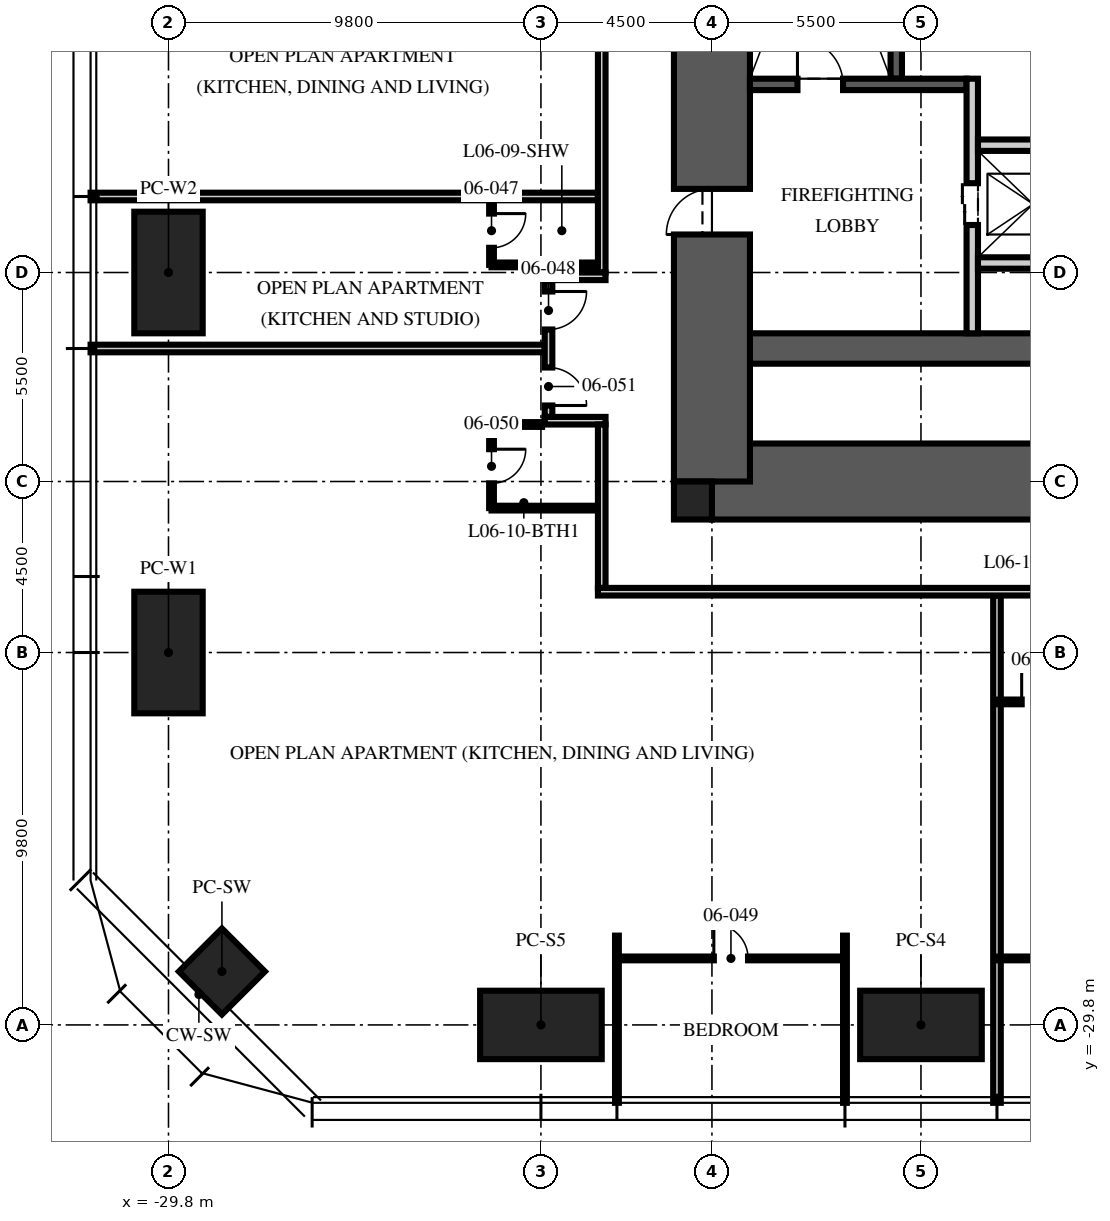
"""IFC4 building model, lengths in metres.
Left out: names, types, materials, properties, quantities, classifications, styles, units other than length and angle.
Written with IfcOpenShell. Run it as: python <this file> out.ifc"""

import sys

from ifc_helpers import new_model, si_unit, direction, frame, frame_2d, origin, origin_2d, place, context, subcontext, project, spatial, rectangle, hollow_rectangle, extrude, element, fill, save


model = new_model("IFC4")
c1 = context("Model", 3, precision=1e-05, world=origin(), true_north=direction((0.0, 1.0)))
c2 = subcontext(c1, "Body", "Model", "MODEL_VIEW")
j1 = project(units=[si_unit("LENGTHUNIT", "METRE"), si_unit("PLANEANGLEUNIT", "RADIAN")], contexts=[c1])
p1 = place(None, origin())
s1 = spatial("IfcSite", under=j1, at=p1, CompositionType="ELEMENT")
p2 = place(p1, origin())
s2 = spatial("IfcBuilding", under=s1, at=p2, CompositionType="ELEMENT")
p3 = place(p2, frame((0.0, 0.0, 28.5)))
s3 = spatial("IfcBuildingStorey", under=s2, at=p3, CompositionType="ELEMENT", Elevation=28.5)
p4 = place(p3, frame((-15.5, -15.5, -0.25), z_axis=(0.0, 0.0, 1.0), x_axis=(1.0, 0.0, 0.0)))
e1 = element("IfcWall", 1, at=p4, inside=s3, PredefinedType="SHEAR", context=c2, shape_type="SweptSolid", body=[
    extrude(rectangle(XDim=31.0, YDim=2.0, at=frame_2d((15.5, 0.0))), origin(), (0.0, 0.0, 1.0), 3.75),
])
p5 = place(p3, frame((-15.5, -12.0, -0.25), z_axis=(0.0, 0.0, 1.0), x_axis=(1.0, 0.0, 0.0)))
e2 = element("IfcWall", 2, at=p5, inside=s3, PredefinedType="SHEAR", context=c2, shape_type="SweptSolid", body=[
    extrude(rectangle(XDim=31.0, YDim=0.8, at=frame_2d((15.5, 0.0))), origin(), (0.0, 0.0, 1.0), 3.75),
])
p6 = place(p3, frame((-15.5, -15.5, -0.25), z_axis=(0.0, 0.0, 1.0), x_axis=(0.0, 1.0, 0.0)))
e3 = element("IfcWall", 3, at=p6, inside=s3, PredefinedType="SHEAR", context=c2, shape_type="SweptSolid", body=[
    extrude(rectangle(XDim=31.0, YDim=2.0, at=frame_2d((15.5, 0.0))), origin(), (0.0, 0.0, 1.0), 3.75),
])
p7 = place(p6, frame((6.5, 0.0, 0.25)))
e4 = element("IfcOpeningElement", 4, at=p7, cuts=e3, PredefinedType="OPENING", context=c2, shape_type="SweptSolid", body=[
    extrude(rectangle(XDim=1.2, YDim=2.1, at=frame_2d((0.6, 1.05))), frame((0.0, 1.01, 0.0), z_axis=(0.0, -1.0, 0.0), x_axis=(1.0, 0.0, 0.0)), (0.0, 0.0, 1.0), 2.02),
])
p8 = place(p6, frame((23.0, 0.0, 0.25)))
e5 = element("IfcOpeningElement", 5, at=p8, cuts=e3, PredefinedType="OPENING", context=c2, shape_type="SweptSolid", body=[
    extrude(rectangle(XDim=1.8, YDim=2.1, at=frame_2d((0.9, 1.05))), frame((0.0, 1.01, 0.0), z_axis=(0.0, -1.0, 0.0), x_axis=(1.0, 0.0, 0.0)), (0.0, 0.0, 1.0), 2.02),
])
p9 = place(p3, frame((-16.0, -16.0, -0.25), z_axis=(0.0, 0.0, 1.0), x_axis=(1.0, 0.0, 0.0)))
e6 = element("IfcColumn", 6, at=p9, inside=s3, PredefinedType="COLUMN", context=c2, shape_type="SweptSolid", body=[
    extrude(rectangle(XDim=1.0, YDim=1.0, at=origin_2d()), origin(), (0.0, 0.0, 1.0), 3.75),
])
for number, where, z_axis, x_axis in (
    (7, (-10.0, -29.8, 0.0), (0.0, 0.0, 1.0), (1.0, 0.0, 0.0)),
    (8, (-20.0, -29.8, 0.0), (0.0, 0.0, 1.0), (1.0, 0.0, 0.0)),
    (9, (-29.8, -20.0, 0.0), (0.0, 0.0, 1.0), (0.0, 1.0, 0.0)),
    (10, (-29.8, -10.0, 0.0), (0.0, 0.0, 1.0), (0.0, 1.0, 0.0)),
):
    element("IfcColumn", number, at=place(p3, frame(where, z_axis=z_axis, x_axis=x_axis)), inside=s3, PredefinedType="COLUMN", context=c2, shape_type="SweptSolid", body=[
        extrude(hollow_rectangle(XDim=3.2, YDim=1.8, WallThickness=0.2, at=origin_2d()), origin(), (0.0, 0.0, 1.0), 3.75),
    ])
p10 = place(p3, frame((-28.394, -28.394, 0.0), z_axis=(0.0, 0.0, 1.0), x_axis=(0.707106781187, -0.707106781187, 0.0)))
e11 = element("IfcColumn", 11, at=p10, inside=s3, PredefinedType="COLUMN", context=c2, shape_type="SweptSolid", body=[
    extrude(hollow_rectangle(XDim=1.6, YDim=1.6, WallThickness=0.1, at=origin_2d()), origin(), (0.0, 0.0, 1.0), 3.75),
])
p11 = place(p3, frame((-10.65, -4.9, 0.0), z_axis=(0.0, 0.0, 1.0), x_axis=(0.0, 1.0, 0.0)))
e12 = element("IfcWall", 12, at=p11, inside=s3, PredefinedType="SOLIDWALL", context=c2, shape_type="SweptSolid", body=[
    extrude(rectangle(XDim=10.1, YDim=0.3, at=frame_2d((5.05, 0.0))), origin(), (0.0, 0.0, 1.0), 3.5),
])
p12 = place(p3, frame((-14.5, -5.05, 0.0), z_axis=(0.0, 0.0, 1.0), x_axis=(1.0, 0.0, 0.0)))
e13 = element("IfcWall", 13, at=p12, inside=s3, PredefinedType="SOLIDWALL", context=c2, shape_type="SweptSolid", body=[
    extrude(rectangle(XDim=5.7, YDim=0.3, at=frame_2d((2.85, 0.0))), origin(), (0.0, 0.0, 1.0), 3.5),
])
p13 = place(p12, frame((1.25, 0.0, 0.0)))
e14 = element("IfcOpeningElement", 14, at=p13, cuts=e13, PredefinedType="OPENING", context=c2, shape_type="SweptSolid", body=[
    extrude(rectangle(XDim=1.2, YDim=2.1, at=frame_2d((0.6, 1.05))), frame((0.0, 0.16, 0.0), z_axis=(0.0, -1.0, 0.0), x_axis=(1.0, 0.0, 0.0)), (0.0, 0.0, 1.0), 0.32),
])
p14 = place(p3, frame((-8.65, -11.6, 0.0), z_axis=(0.0, 0.0, 1.0), x_axis=(0.0, 1.0, 0.0)))
e15 = element("IfcWall", 15, at=p14, inside=s3, PredefinedType="PARTITIONING", context=c2, shape_type="SweptSolid", body=[
    extrude(rectangle(XDim=6.7, YDim=0.3, at=frame_2d((3.35, 0.0))), origin(), (0.0, 0.0, 1.0), 3.5),
])
p15 = place(p14, frame((2.85, 0.0, 0.0)))
e16 = element("IfcOpeningElement", 16, at=p15, cuts=e15, PredefinedType="OPENING", context=c2, shape_type="SweptSolid", body=[
    extrude(rectangle(XDim=1.1, YDim=2.1, at=frame_2d((0.55, 1.05))), frame((0.0, 0.16, 0.0), z_axis=(0.0, -1.0, 0.0), x_axis=(1.0, 0.0, 0.0)), (0.0, 0.0, 1.0), 0.32),
])
p16 = place(p3, frame((-8.5, -6.65, 0.0), z_axis=(0.0, 0.0, 1.0), x_axis=(1.0, 0.0, 0.0)))
e17 = element("IfcWall", 17, at=p16, inside=s3, PredefinedType="PARTITIONING", context=c2, shape_type="SweptSolid", body=[
    extrude(rectangle(XDim=17.0, YDim=0.3, at=frame_2d((8.5, 0.0))), origin(), (0.0, 0.0, 1.0), 3.5),
])
p17 = place(p16, frame((7.8, 0.0, 0.0)))
e18 = element("IfcOpeningElement", 18, at=p17, cuts=e17, PredefinedType="OPENING", context=c2, shape_type="SweptSolid", body=[
    extrude(rectangle(XDim=1.3, YDim=2.4, at=frame_2d((0.65, 1.2))), frame((0.0, 0.16, 0.0), z_axis=(0.0, -1.0, 0.0), x_axis=(1.0, 0.0, 0.0)), (0.0, 0.0, 1.0), 0.32),
])
p18 = place(p16, frame((5.65, 0.0, 0.0)))
e19 = element("IfcOpeningElement", 19, at=p18, cuts=e17, PredefinedType="OPENING", context=c2, shape_type="SweptSolid", body=[
    extrude(rectangle(XDim=0.9, YDim=2.1, at=frame_2d((0.45, 1.05))), frame((0.0, 0.16, 0.0), z_axis=(0.0, -1.0, 0.0), x_axis=(1.0, 0.0, 0.0)), (0.0, 0.0, 1.0), 0.32),
])
p19 = place(p16, frame((10.4, 0.0, 0.0)))
e20 = element("IfcOpeningElement", 20, at=p19, cuts=e17, PredefinedType="OPENING", context=c2, shape_type="SweptSolid", body=[
    extrude(rectangle(XDim=0.9, YDim=2.1, at=frame_2d((0.45, 1.05))), frame((0.0, 0.16, 0.0), z_axis=(0.0, -1.0, 0.0), x_axis=(1.0, 0.0, 0.0)), (0.0, 0.0, 1.0), 0.32),
])
p20 = place(p3, frame((-8.5, -9.75, 0.0), z_axis=(0.0, 0.0, 1.0), x_axis=(1.0, 0.0, 0.0)))
e21 = element("IfcWall", 21, at=p20, inside=s3, PredefinedType="PARTITIONING", context=c2, shape_type="SweptSolid", body=[
    extrude(rectangle(XDim=2.9, YDim=0.3, at=frame_2d((1.45, 0.0))), origin(), (0.0, 0.0, 1.0), 3.5),
])
p21 = place(p3, frame((-18.5, -8.0, 0.0), z_axis=(0.0, 0.0, 1.0), x_axis=(-1.0, 0.0, 0.0)))
e22 = element("IfcWall", 22, at=p21, inside=s3, PredefinedType="PARTITIONING", context=c2, shape_type="SweptSolid", body=[
    extrude(rectangle(XDim=13.35, YDim=0.2, at=frame_2d((6.675, 0.0))), origin(), (0.0, 0.0, 1.0), 2.71),
])
p22 = place(p3, frame((-19.9, -12.0, 0.0), z_axis=(0.0, 0.0, 1.0), x_axis=(-1.0, 0.0, 0.0)))
e23 = element("IfcWall", 23, at=p22, inside=s3, PredefinedType="PARTITIONING", context=c2, shape_type="SweptSolid", body=[
    extrude(rectangle(XDim=11.95, YDim=0.2, at=frame_2d((5.975, 0.0))), origin(), (0.0, 0.0, 1.0), 2.71),
])
for number, where, z_axis, x_axis in (
    (24, (-18.0, -27.45, 0.0), (0.0, 0.0, 1.0), (0.0, -1.0, 0.0)),
    (25, (-12.0, -27.45, 0.0), (0.0, 0.0, 1.0), (0.0, -1.0, 0.0)),
):
    element("IfcWall", number, at=place(p3, frame(where, z_axis=z_axis, x_axis=x_axis)), inside=s3, PredefinedType="PARTITIONING", context=c2, shape_type="SweptSolid", body=[
        extrude(rectangle(XDim=4.4, YDim=0.1, at=frame_2d((2.2, 0.0))), origin(), (0.0, 0.0, 1.0), 2.71),
    ])
p23 = place(p3, frame((-8.0, -18.5, 0.0), z_axis=(0.0, 0.0, 1.0), x_axis=(0.0, -1.0, 0.0)))
e26 = element("IfcWall", 26, at=p23, inside=s3, PredefinedType="PARTITIONING", context=c2, shape_type="SweptSolid", body=[
    extrude(rectangle(XDim=13.35, YDim=0.2, at=frame_2d((6.675, 0.0))), origin(), (0.0, 0.0, 1.0), 2.71),
])
p24 = place(p3, frame((-21.3, -8.0, 0.0), z_axis=(0.0, 0.0, 1.0), x_axis=(0.0, -1.0, 0.0)))
e27 = element("IfcWall", 27, at=p24, inside=s3, PredefinedType="PARTITIONING", context=c2, shape_type="SweptSolid", body=[
    extrude(rectangle(XDim=1.8, YDim=0.125, at=frame_2d((0.9, 0.0))), origin(), (0.0, 0.0, 1.0), 3.5),
])
p25 = place(p24, frame((0.45, 0.0, 0.0)))
e28 = element("IfcOpeningElement", 28, at=p25, cuts=e27, PredefinedType="OPENING", context=c2, shape_type="SweptSolid", body=[
    extrude(rectangle(XDim=0.9, YDim=2.1, at=frame_2d((0.45, 1.05))), frame((0.0, 0.073, 0.0), z_axis=(0.0, -1.0, 0.0), x_axis=(1.0, 0.0, 0.0)), (0.0, 0.0, 1.0), 0.145),
])
p26 = place(p3, frame((-18.5, -9.8, 0.0), z_axis=(0.0, 0.0, 1.0), x_axis=(-1.0, 0.0, 0.0)))
e29 = element("IfcWall", 29, at=p26, inside=s3, PredefinedType="PARTITIONING", context=c2, shape_type="SweptSolid", body=[
    extrude(rectangle(XDim=2.8, YDim=0.125, at=frame_2d((1.4, 0.0))), origin(), (0.0, 0.0, 1.0), 2.492),
])
p27 = place(p3, frame((-18.0, -28.05, 0.0), z_axis=(0.0, 0.0, 1.0), x_axis=(1.0, 0.0, 0.0)))
e30 = element("IfcWall", 30, at=p27, inside=s3, PredefinedType="PARTITIONING", context=c2, shape_type="SweptSolid", body=[
    extrude(rectangle(XDim=6.0, YDim=0.1, at=frame_2d((3.0, 0.0))), origin(), (0.0, 0.0, 1.0), 2.61),
])
p28 = place(p27, frame((2.55, 0.0, 0.0)))
e31 = element("IfcOpeningElement", 31, at=p28, cuts=e30, PredefinedType="OPENING", context=c2, shape_type="SweptSolid", body=[
    extrude(rectangle(XDim=0.9, YDim=2.1, at=frame_2d((0.45, 1.05))), frame((0.0, 0.06, 0.0), z_axis=(0.0, -1.0, 0.0), x_axis=(1.0, 0.0, 0.0)), (0.0, 0.0, 1.0), 0.12),
])
p29 = place(p3, frame((-21.3, -14.0, 0.0), z_axis=(0.0, 0.0, 1.0), x_axis=(0.0, -1.0, 0.0)))
e32 = element("IfcWall", 32, at=p29, inside=s3, PredefinedType="PARTITIONING", context=c2, shape_type="SweptSolid", body=[
    extrude(rectangle(XDim=2.2, YDim=0.125, at=frame_2d((1.1, 0.0))), origin(), (0.0, 0.0, 1.0), 2.61),
])
p30 = place(p29, frame((0.65, 0.0, 0.0)))
e33 = element("IfcOpeningElement", 33, at=p30, cuts=e32, PredefinedType="OPENING", context=c2, shape_type="SweptSolid", body=[
    extrude(rectangle(XDim=0.9, YDim=2.1, at=frame_2d((0.45, 1.05))), frame((0.0, 0.073, 0.0), z_axis=(0.0, -1.0, 0.0), x_axis=(1.0, 0.0, 0.0)), (0.0, 0.0, 1.0), 0.145),
])
p31 = place(p3, frame((-19.97, -14.0, 0.0), z_axis=(0.0, 0.0, 1.0), x_axis=(-1.0, 0.0, 0.0)))
e34 = element("IfcWall", 34, at=p31, inside=s3, PredefinedType="PARTITIONING", context=c2, shape_type="SweptSolid", body=[
    extrude(rectangle(XDim=1.33, YDim=0.125, at=frame_2d((0.665, 0.0))), origin(), (0.0, 0.0, 1.0), 3.5),
])
p32 = place(p3, frame((-18.5, -16.2, 0.0), z_axis=(0.0, 0.0, 1.0), x_axis=(-1.0, 0.0, 0.0)))
e35 = element("IfcWall", 35, at=p32, inside=s3, PredefinedType="PARTITIONING", context=c2, shape_type="SweptSolid", body=[
    extrude(rectangle(XDim=2.8, YDim=0.125, at=frame_2d((1.4, 0.0))), origin(), (0.0, 0.0, 1.0), 3.5),
])
p33 = place(p3, frame((-8.0, -28.05, 0.0), z_axis=(0.0, 0.0, 1.0), x_axis=(1.0, 0.0, 0.0)))
e36 = element("IfcWall", 36, at=p33, inside=s3, PredefinedType="PARTITIONING", context=c2, shape_type="SweptSolid", body=[
    extrude(rectangle(XDim=6.0, YDim=0.1, at=frame_2d((3.0, 0.0))), origin(), (0.0, 0.0, 1.0), 2.61),
])
p34 = place(p33, frame((2.55, 0.0, 0.0)))
e37 = element("IfcOpeningElement", 37, at=p34, cuts=e36, PredefinedType="OPENING", context=c2, shape_type="SweptSolid", body=[
    extrude(rectangle(XDim=0.9, YDim=2.1, at=frame_2d((0.45, 1.05))), frame((0.0, 0.06, 0.0), z_axis=(0.0, -1.0, 0.0), x_axis=(1.0, 0.0, 0.0)), (0.0, 0.0, 1.0), 0.12),
])
p35 = place(p3, frame((-8.0, -21.3, 0.0), z_axis=(0.0, 0.0, 1.0), x_axis=(1.0, 0.0, 0.0)))
e38 = element("IfcWall", 38, at=p35, inside=s3, PredefinedType="PARTITIONING", context=c2, shape_type="SweptSolid", body=[
    extrude(rectangle(XDim=2.2, YDim=0.125, at=frame_2d((1.1, 0.0))), origin(), (0.0, 0.0, 1.0), 3.5),
])
p36 = place(p35, frame((0.65, 0.0, 0.0)))
e39 = element("IfcOpeningElement", 39, at=p36, cuts=e38, PredefinedType="OPENING", context=c2, shape_type="SweptSolid", body=[
    extrude(rectangle(XDim=0.9, YDim=2.1, at=frame_2d((0.45, 1.05))), frame((0.0, 0.073, 0.0), z_axis=(0.0, -1.0, 0.0), x_axis=(1.0, 0.0, 0.0)), (0.0, 0.0, 1.0), 0.145),
])
p37 = place(p3, frame((-18.4, 6.0, 0.0), z_axis=(0.0, 0.0, 1.0), x_axis=(0.0, -1.0, 0.0)))
e40 = element("IfcWall", 40, at=p37, inside=s3, PredefinedType="PARTITIONING", context=c2, shape_type="SweptSolid", body=[
    extrude(rectangle(XDim=16.0, YDim=0.2, at=frame_2d((8.0, 0.0))), origin(), (0.0, 0.0, 1.0), 2.492),
])
p38 = place(p3, frame((-18.3, -10.1, 0.0), z_axis=(0.0, 0.0, 1.0), x_axis=(-1.0, 0.0, 0.0)))
e41 = element("IfcWall", 41, at=p38, inside=s3, PredefinedType="PARTITIONING", context=c2, shape_type="SweptSolid", body=[
    extrude(rectangle(XDim=1.6, YDim=0.2, at=frame_2d((0.8, 0.0))), origin(), (0.0, 0.0, 1.0), 2.492),
])
p39 = place(p3, frame((-18.3, -13.9, 0.0), z_axis=(0.0, 0.0, 1.0), x_axis=(-1.0, 0.0, 0.0)))
e42 = element("IfcWall", 42, at=p39, inside=s3, PredefinedType="PARTITIONING", context=c2, shape_type="SweptSolid", body=[
    extrude(rectangle(XDim=1.6, YDim=0.2, at=frame_2d((0.8, 0.0))), origin(), (0.0, 0.0, 1.0), 3.5),
])
p40 = place(p3, frame((-19.8, -10.2, 0.0), z_axis=(0.0, 0.0, 1.0), x_axis=(0.0, -1.0, 0.0)))
e43 = element("IfcWall", 43, at=p40, inside=s3, PredefinedType="PARTITIONING", context=c2, shape_type="SweptSolid", body=[
    extrude(rectangle(XDim=3.6, YDim=0.2, at=frame_2d((1.8, 0.0))), origin(), (0.0, 0.0, 1.0), 3.5),
])
p41 = place(p40, frame((0.3, 0.0, 0.0)))
e44 = element("IfcOpeningElement", 44, at=p41, cuts=e43, PredefinedType="OPENING", context=c2, shape_type="SweptSolid", body=[
    extrude(rectangle(XDim=1.0, YDim=2.2, at=frame_2d((0.5, 1.1))), frame((0.0, 0.11, 0.0), z_axis=(0.0, -1.0, 0.0), x_axis=(1.0, 0.0, 0.0)), (0.0, 0.0, 1.0), 0.22),
])
p42 = place(p40, frame((2.3, 0.0, 0.0)))
e45 = element("IfcOpeningElement", 45, at=p42, cuts=e43, PredefinedType="OPENING", context=c2, shape_type="SweptSolid", body=[
    extrude(rectangle(XDim=1.0, YDim=2.2, at=frame_2d((0.5, 1.1))), frame((0.0, 0.11, 0.0), z_axis=(0.0, -1.0, 0.0), x_axis=(1.0, 0.0, 0.0)), (0.0, 0.0, 1.0), 0.22),
])
p43 = place(p3, frame((-18.4, -14.0, 0.0), z_axis=(0.0, 0.0, 1.0), x_axis=(0.0, -1.0, 0.0)))
e46 = element("IfcWall", 46, at=p43, inside=s3, PredefinedType="PARTITIONING", context=c2, shape_type="SweptSolid", body=[
    extrude(rectangle(XDim=4.3, YDim=0.2, at=frame_2d((2.15, 0.0))), origin(), (0.0, 0.0, 1.0), 2.3),
])
p44 = place(p3, frame((0.0, -18.4, 0.0), z_axis=(0.0, 0.0, 1.0), x_axis=(-1.0, 0.0, 0.0)))
e47 = element("IfcWall", 47, at=p44, inside=s3, PredefinedType="PARTITIONING", context=c2, shape_type="SweptSolid", body=[
    extrude(rectangle(XDim=18.5, YDim=0.2, at=frame_2d((9.25, 0.0))), origin(), (0.0, 0.0, 1.0), 2.3),
])
p45 = place(p13, origin())
e48 = element("IfcDoor", 48, at=p45, inside=s3, OperationType="SINGLE_SWING_LEFT", PredefinedType="DOOR", context=c2, shape_type="SweptSolid", body=[
    extrude(rectangle(XDim=1.2, YDim=2.1, at=frame_2d((0.6, 1.05))), frame((0.0, 0.025, 0.0), z_axis=(0.0, -1.0, 0.0), x_axis=(1.0, 0.0, 0.0)), (0.0, 0.0, 1.0), 0.05),
])
fill(e14, e48)
p46 = place(p7, origin())
e49 = element("IfcDoor", 49, at=p46, inside=s3, OperationType="SINGLE_SWING_LEFT", PredefinedType="DOOR", context=c2, shape_type="SweptSolid", body=[
    extrude(rectangle(XDim=1.2, YDim=2.1, at=frame_2d((0.6, 1.05))), frame((0.0, 0.025, 0.0), z_axis=(0.0, -1.0, 0.0), x_axis=(1.0, 0.0, 0.0)), (0.0, 0.0, 1.0), 0.05),
])
fill(e4, e49)
p47 = place(p15, origin())
e50 = element("IfcDoor", 50, at=p47, inside=s3, OperationType="DOUBLE_DOOR_SLIDING", PredefinedType="DOOR", context=c2, shape_type="SweptSolid", body=[
    extrude(rectangle(XDim=1.1, YDim=2.1, at=frame_2d((0.55, 1.05))), frame((0.0, 0.025, 0.0), z_axis=(0.0, -1.0, 0.0), x_axis=(1.0, 0.0, 0.0)), (0.0, 0.0, 1.0), 0.05),
])
fill(e16, e50)
p48 = place(p25, origin())
e51 = element("IfcDoor", 51, at=p48, inside=s3, OperationType="SINGLE_SWING_LEFT", PredefinedType="DOOR", context=c2, shape_type="SweptSolid", body=[
    extrude(rectangle(XDim=0.9, YDim=2.1, at=frame_2d((0.45, 1.05))), frame((0.0, 0.025, 0.0), z_axis=(0.0, -1.0, 0.0), x_axis=(1.0, 0.0, 0.0)), (0.0, 0.0, 1.0), 0.05),
])
fill(e28, e51)
p49 = place(p41, origin())
e52 = element("IfcDoor", 52, at=p49, inside=s3, OperationType="SINGLE_SWING_LEFT", PredefinedType="DOOR", context=c2, shape_type="SweptSolid", body=[
    extrude(rectangle(XDim=1.0, YDim=2.2, at=frame_2d((0.5, 1.1))), frame((0.0, 0.025, 0.0), z_axis=(0.0, -1.0, 0.0), x_axis=(1.0, 0.0, 0.0)), (0.0, 0.0, 1.0), 0.05),
])
fill(e44, e52)
p50 = place(p28, origin())
e53 = element("IfcDoor", 53, at=p50, inside=s3, OperationType="SINGLE_SWING_LEFT", PredefinedType="DOOR", context=c2, shape_type="SweptSolid", body=[
    extrude(rectangle(XDim=0.9, YDim=2.1, at=frame_2d((0.45, 1.05))), frame((0.0, 0.025, 0.0), z_axis=(0.0, -1.0, 0.0), x_axis=(1.0, 0.0, 0.0)), (0.0, 0.0, 1.0), 0.05),
])
fill(e31, e53)
p51 = place(p30, origin())
e54 = element("IfcDoor", 54, at=p51, inside=s3, OperationType="SINGLE_SWING_LEFT", PredefinedType="DOOR", context=c2, shape_type="SweptSolid", body=[
    extrude(rectangle(XDim=0.9, YDim=2.1, at=frame_2d((0.45, 1.05))), frame((0.0, 0.025, 0.0), z_axis=(0.0, -1.0, 0.0), x_axis=(1.0, 0.0, 0.0)), (0.0, 0.0, 1.0), 0.05),
])
fill(e33, e54)
p52 = place(p42, origin())
e55 = element("IfcDoor", 55, at=p52, inside=s3, OperationType="SINGLE_SWING_RIGHT", PredefinedType="DOOR", context=c2, shape_type="SweptSolid", body=[
    extrude(rectangle(XDim=1.0, YDim=2.2, at=frame_2d((0.5, 1.1))), frame((0.0, 0.025, 0.0), z_axis=(0.0, -1.0, 0.0), x_axis=(1.0, 0.0, 0.0)), (0.0, 0.0, 1.0), 0.05),
])
fill(e45, e55)
p53 = place(p36, origin())
e56 = element("IfcDoor", 56, at=p53, inside=s3, OperationType="SINGLE_SWING_LEFT", PredefinedType="DOOR", context=c2, shape_type="SweptSolid", body=[
    extrude(rectangle(XDim=0.9, YDim=2.1, at=frame_2d((0.45, 1.05))), frame((0.0, 0.025, 0.0), z_axis=(0.0, -1.0, 0.0), x_axis=(1.0, 0.0, 0.0)), (0.0, 0.0, 1.0), 0.05),
])
fill(e39, e56)
save(model, sys.argv[1])
